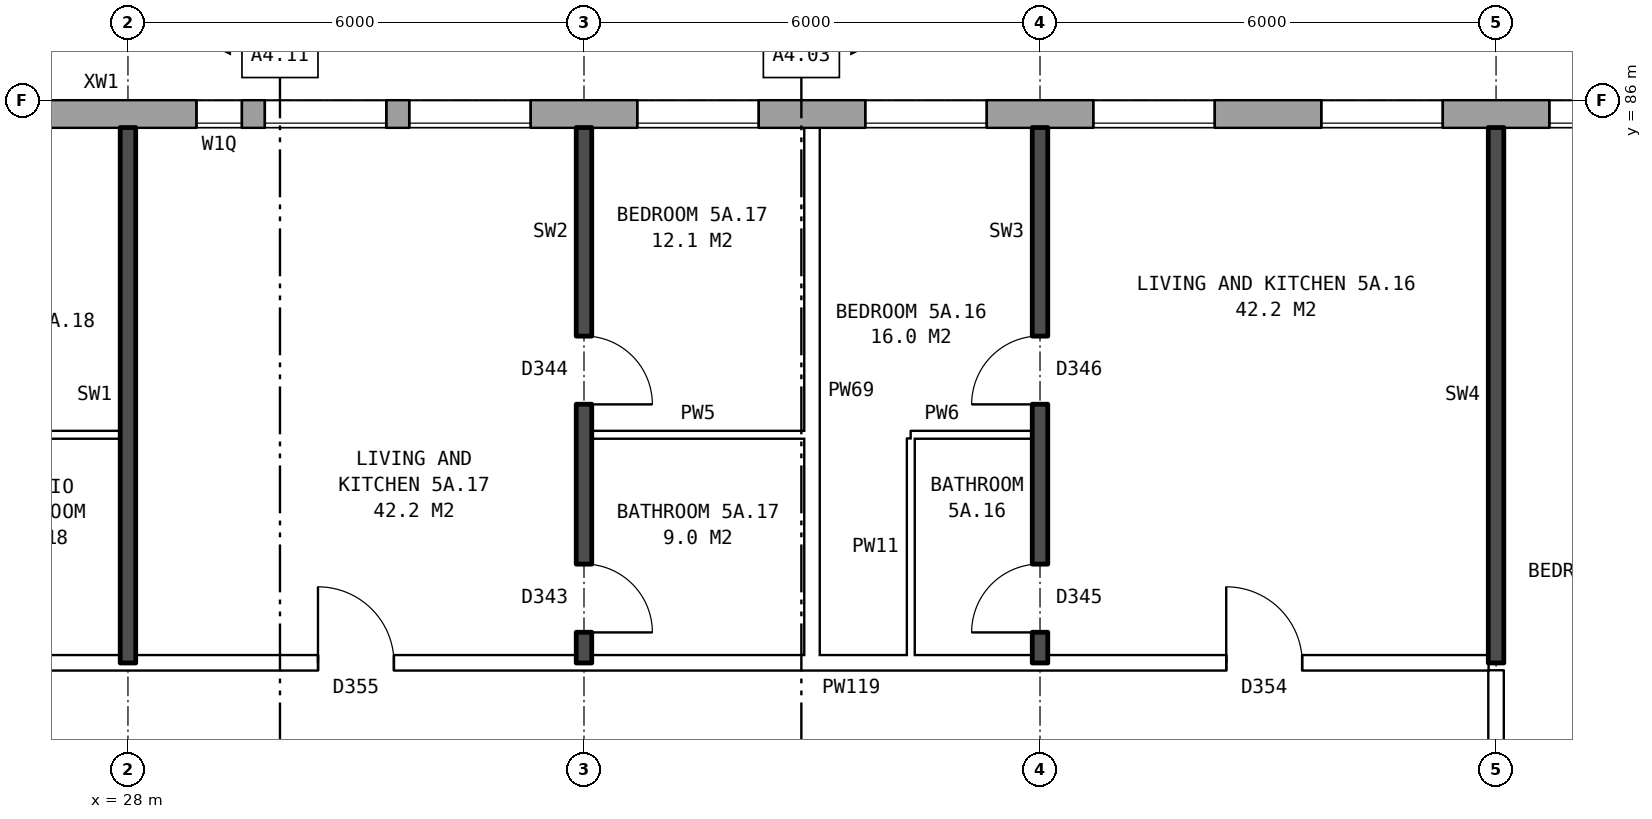
"""IFC4 building model, lengths in metres.
Left out: names, types, materials, properties, quantities, classifications, styles, units other than length and angle.
Written with IfcOpenShell. Run it as: python <this file> out.ifc"""

import sys

from ifc_helpers import new_model, si_unit, direction, frame, frame_2d, origin, place, context, subcontext, project, spatial, rectangle, extrude, element, fill, save


model = new_model("IFC4")
c1 = context("Model", 3, precision=1e-05, world=origin(), true_north=direction((0.0, 1.0)))
c2 = subcontext(c1, "Body", "Model", "MODEL_VIEW")
j1 = project(units=[si_unit("LENGTHUNIT", "METRE"), si_unit("PLANEANGLEUNIT", "RADIAN")], contexts=[c1])
p1 = place(None, origin())
s1 = spatial("IfcSite", under=j1, at=p1, CompositionType="ELEMENT")
p2 = place(p1, origin())
s2 = spatial("IfcBuilding", under=s1, at=p2, CompositionType="ELEMENT")
p3 = place(p2, frame((0.0, 0.0, 22.6)))
s3 = spatial("IfcBuildingStorey", under=s2, at=p3, CompositionType="ELEMENT", Elevation=22.6)
p4 = place(p3, frame((72.925, 85.82, 0.0), z_axis=(0.0, 0.0, 1.0), x_axis=(-1.0, 0.0, 0.0)))
e1 = element("IfcWall", 1, at=p4, inside=s3, PredefinedType="STANDARD", context=c2, shape_type="SweptSolid", body=[
    extrude(rectangle(XDim=50.101, YDim=0.36, at=frame_2d((25.05, 0.0))), origin(), (0.0, 0.0, 1.0), 2.85),
])
p5 = place(p4, frame((0.625, 0.0, 0.8)))
e2 = element("IfcOpeningElement", 2, at=p5, cuts=e1, PredefinedType="OPENING", context=c2, shape_type="SweptSolid", body=[
    extrude(rectangle(XDim=1.6, YDim=1.8, at=frame_2d((0.8, 0.9))), frame((0.0, 0.19, 0.0), z_axis=(0.0, -1.0, 0.0), x_axis=(1.0, 0.0, 0.0)), (0.0, 0.0, 1.0), 0.38),
])
p6 = place(p4, frame((3.125, 0.0, 1.7)))
e3 = element("IfcOpeningElement", 3, at=p6, cuts=e1, PredefinedType="OPENING", context=c2, shape_type="SweptSolid", body=[
    extrude(rectangle(XDim=0.8, YDim=0.9, at=frame_2d((0.4, 0.45))), frame((0.0, 0.19, 0.0), z_axis=(0.0, -1.0, 0.0), x_axis=(1.0, 0.0, 0.0)), (0.0, 0.0, 1.0), 0.38),
])
p7 = place(p4, frame((6.625, 0.0, 0.8)))
e4 = element("IfcOpeningElement", 4, at=p7, cuts=e1, PredefinedType="OPENING", context=c2, shape_type="SweptSolid", body=[
    extrude(rectangle(XDim=1.6, YDim=1.8, at=frame_2d((0.8, 0.9))), frame((0.0, 0.19, 0.0), z_axis=(0.0, -1.0, 0.0), x_axis=(1.0, 0.0, 0.0)), (0.0, 0.0, 1.0), 0.38),
])
p8 = place(p4, frame((9.625, 0.0, 0.8)))
e5 = element("IfcOpeningElement", 5, at=p8, cuts=e1, PredefinedType="OPENING", context=c2, shape_type="SweptSolid", body=[
    extrude(rectangle(XDim=1.6, YDim=1.8, at=frame_2d((0.8, 0.9))), frame((0.0, 0.19, 0.0), z_axis=(0.0, -1.0, 0.0), x_axis=(1.0, 0.0, 0.0)), (0.0, 0.0, 1.0), 0.38),
])
p9 = place(p4, frame((12.625, 0.0, 0.8)))
e6 = element("IfcOpeningElement", 6, at=p9, cuts=e1, PredefinedType="OPENING", context=c2, shape_type="SweptSolid", body=[
    extrude(rectangle(XDim=1.6, YDim=1.8, at=frame_2d((0.8, 0.9))), frame((0.0, 0.19, 0.0), z_axis=(0.0, -1.0, 0.0), x_axis=(1.0, 0.0, 0.0)), (0.0, 0.0, 1.0), 0.38),
])
p10 = place(p4, frame((15.625, 0.0, 0.8)))
e7 = element("IfcOpeningElement", 7, at=p10, cuts=e1, PredefinedType="OPENING", context=c2, shape_type="SweptSolid", body=[
    extrude(rectangle(XDim=1.6, YDim=1.8, at=frame_2d((0.8, 0.9))), frame((0.0, 0.19, 0.0), z_axis=(0.0, -1.0, 0.0), x_axis=(1.0, 0.0, 0.0)), (0.0, 0.0, 1.0), 0.38),
])
p11 = place(p4, frame((18.625, 0.0, 0.8)))
e8 = element("IfcOpeningElement", 8, at=p11, cuts=e1, PredefinedType="OPENING", context=c2, shape_type="SweptSolid", body=[
    extrude(rectangle(XDim=1.6, YDim=1.8, at=frame_2d((0.8, 0.9))), frame((0.0, 0.19, 0.0), z_axis=(0.0, -1.0, 0.0), x_axis=(1.0, 0.0, 0.0)), (0.0, 0.0, 1.0), 0.38),
])
p12 = place(p4, frame((21.625, 0.0, 0.8)))
e9 = element("IfcOpeningElement", 9, at=p12, cuts=e1, PredefinedType="OPENING", context=c2, shape_type="SweptSolid", body=[
    extrude(rectangle(XDim=1.6, YDim=1.8, at=frame_2d((0.8, 0.9))), frame((0.0, 0.19, 0.0), z_axis=(0.0, -1.0, 0.0), x_axis=(1.0, 0.0, 0.0)), (0.0, 0.0, 1.0), 0.38),
])
p13 = place(p4, frame((24.625, 0.0, 0.8)))
e10 = element("IfcOpeningElement", 10, at=p13, cuts=e1, PredefinedType="OPENING", context=c2, shape_type="SweptSolid", body=[
    extrude(rectangle(XDim=1.6, YDim=1.8, at=frame_2d((0.8, 0.9))), frame((0.0, 0.19, 0.0), z_axis=(0.0, -1.0, 0.0), x_axis=(1.0, 0.0, 0.0)), (0.0, 0.0, 1.0), 0.38),
])
p14 = place(p4, frame((27.625, 0.0, 0.8)))
e11 = element("IfcOpeningElement", 11, at=p14, cuts=e1, PredefinedType="OPENING", context=c2, shape_type="SweptSolid", body=[
    extrude(rectangle(XDim=1.6, YDim=1.8, at=frame_2d((0.8, 0.9))), frame((0.0, 0.19, 0.0), z_axis=(0.0, -1.0, 0.0), x_axis=(1.0, 0.0, 0.0)), (0.0, 0.0, 1.0), 0.38),
])
p15 = place(p4, frame((30.625, 0.0, 0.8)))
e12 = element("IfcOpeningElement", 12, at=p15, cuts=e1, PredefinedType="OPENING", context=c2, shape_type="SweptSolid", body=[
    extrude(rectangle(XDim=1.6, YDim=1.8, at=frame_2d((0.8, 0.9))), frame((0.0, 0.19, 0.0), z_axis=(0.0, -1.0, 0.0), x_axis=(1.0, 0.0, 0.0)), (0.0, 0.0, 1.0), 0.38),
])
p16 = place(p4, frame((33.625, 0.0, 0.8)))
e13 = element("IfcOpeningElement", 13, at=p16, cuts=e1, PredefinedType="OPENING", context=c2, shape_type="SweptSolid", body=[
    extrude(rectangle(XDim=1.6, YDim=1.8, at=frame_2d((0.8, 0.9))), frame((0.0, 0.19, 0.0), z_axis=(0.0, -1.0, 0.0), x_axis=(1.0, 0.0, 0.0)), (0.0, 0.0, 1.0), 0.38),
])
p17 = place(p4, frame((36.625, 0.0, 0.8)))
e14 = element("IfcOpeningElement", 14, at=p17, cuts=e1, PredefinedType="OPENING", context=c2, shape_type="SweptSolid", body=[
    extrude(rectangle(XDim=1.6, YDim=1.8, at=frame_2d((0.8, 0.9))), frame((0.0, 0.19, 0.0), z_axis=(0.0, -1.0, 0.0), x_axis=(1.0, 0.0, 0.0)), (0.0, 0.0, 1.0), 0.38),
])
p18 = place(p4, frame((39.625, 0.0, 0.8)))
e15 = element("IfcOpeningElement", 15, at=p18, cuts=e1, PredefinedType="OPENING", context=c2, shape_type="SweptSolid", body=[
    extrude(rectangle(XDim=1.6, YDim=1.8, at=frame_2d((0.8, 0.9))), frame((0.0, 0.19, 0.0), z_axis=(0.0, -1.0, 0.0), x_axis=(1.0, 0.0, 0.0)), (0.0, 0.0, 1.0), 0.38),
])
p19 = place(p4, frame((41.525, 0.0, 0.8)))
e16 = element("IfcOpeningElement", 16, at=p19, cuts=e1, PredefinedType="OPENING", context=c2, shape_type="SweptSolid", body=[
    extrude(rectangle(XDim=1.6, YDim=1.8, at=frame_2d((0.8, 0.9))), frame((0.0, 0.19, 0.0), z_axis=(0.0, -1.0, 0.0), x_axis=(1.0, 0.0, 0.0)), (0.0, 0.0, 1.0), 0.38),
])
p20 = place(p4, frame((46.525, 0.0, 1.4)))
e17 = element("IfcOpeningElement", 17, at=p20, cuts=e1, PredefinedType="OPENING", context=c2, shape_type="SweptSolid", body=[
    extrude(rectangle(XDim=1.0, YDim=1.2, at=frame_2d((0.5, 0.6))), frame((0.0, 0.19, 0.0), z_axis=(0.0, -1.0, 0.0), x_axis=(1.0, 0.0, 0.0)), (0.0, 0.0, 1.0), 0.38),
])
p21 = place(p4, frame((5.475, 0.0, 0.8)))
e18 = element("IfcOpeningElement", 18, at=p21, cuts=e1, PredefinedType="OPENING", context=c2, shape_type="SweptSolid", body=[
    extrude(rectangle(XDim=0.8, YDim=0.9, at=frame_2d((0.4, 0.45))), frame((0.0, 0.19, 0.0), z_axis=(0.0, -1.0, 0.0), x_axis=(1.0, 0.0, 0.0)), (0.0, 0.0, 1.0), 0.38),
])
p22 = place(p4, frame((43.425, 0.0, 0.8)))
e19 = element("IfcOpeningElement", 19, at=p22, cuts=e1, PredefinedType="OPENING", context=c2, shape_type="SweptSolid", body=[
    extrude(rectangle(XDim=0.6, YDim=1.2, at=frame_2d((0.3, 0.6))), frame((0.0, 0.19, 0.0), z_axis=(0.0, -1.0, 0.0), x_axis=(1.0, 0.0, 0.0)), (0.0, 0.0, 1.0), 0.38),
])
p23 = place(p4, frame((47.825, 0.0, 0.8)))
e20 = element("IfcOpeningElement", 20, at=p23, cuts=e1, PredefinedType="OPENING", context=c2, shape_type="SweptSolid", body=[
    extrude(rectangle(XDim=1.4, YDim=1.8, at=frame_2d((0.7, 0.9))), frame((0.0, 0.19, 0.0), z_axis=(0.0, -1.0, 0.0), x_axis=(1.0, 0.0, 0.0)), (0.0, 0.0, 1.0), 0.38),
])
p24 = place(p3, frame((20.11, 78.6, 0.0), z_axis=(0.0, 0.0, 1.0), x_axis=(1.0, 0.0, 0.0)))
e21 = element("IfcWall", 21, at=p24, inside=s3, PredefinedType="PARTITIONING", context=c2, shape_type="SweptSolid", body=[
    extrude(rectangle(XDim=25.79, YDim=0.2, at=frame_2d((12.895, 0.0))), origin(), (0.0, 0.0, 1.0), 2.85),
])
p25 = place(p24, frame((22.34, 0.0, 0.0)))
e22 = element("IfcOpeningElement", 22, at=p25, cuts=e21, PredefinedType="OPENING", context=c2, shape_type="SweptSolid", body=[
    extrude(rectangle(XDim=1.0, YDim=2.1, at=frame_2d((0.5, 1.05))), frame((0.0, 0.11, 0.0), z_axis=(0.0, -1.0, 0.0), x_axis=(1.0, 0.0, 0.0)), (0.0, 0.0, 1.0), 0.22),
])
p26 = place(p24, frame((10.39, 0.0, 0.0)))
e23 = element("IfcOpeningElement", 23, at=p26, cuts=e21, PredefinedType="OPENING", context=c2, shape_type="SweptSolid", body=[
    extrude(rectangle(XDim=1.0, YDim=2.1, at=frame_2d((0.5, 1.05))), frame((0.0, 0.11, 0.0), z_axis=(0.0, -1.0, 0.0), x_axis=(1.0, 0.0, 0.0)), (0.0, 0.0, 1.0), 0.22),
])
p27 = place(p24, frame((2.245, 0.0, 0.0)))
e24 = element("IfcOpeningElement", 24, at=p27, cuts=e21, PredefinedType="OPENING", context=c2, shape_type="SweptSolid", body=[
    extrude(rectangle(XDim=1.0, YDim=2.1, at=frame_2d((0.5, 1.05))), frame((0.0, 0.11, 0.0), z_axis=(0.0, -1.0, 0.0), x_axis=(1.0, 0.0, 0.0)), (0.0, 0.0, 1.0), 0.22),
])
p28 = place(p3, frame((25.6, 81.6, 0.0), z_axis=(0.0, 0.0, 1.0), x_axis=(1.0, 0.0, 0.0)))
e25 = element("IfcWall", 25, at=p28, inside=s3, PredefinedType="PARTITIONING", context=c2, shape_type="SweptSolid", body=[
    extrude(rectangle(XDim=2.3, YDim=0.1, at=frame_2d((1.15, 0.0))), origin(), (0.0, 0.0, 1.0), 2.85),
])
p29 = place(p3, frame((34.1, 81.6, 0.0), z_axis=(0.0, 0.0, 1.0), x_axis=(1.0, 0.0, 0.0)))
e26 = element("IfcWall", 26, at=p29, inside=s3, PredefinedType="PARTITIONING", context=c2, shape_type="SweptSolid", body=[
    extrude(rectangle(XDim=2.8, YDim=0.1, at=frame_2d((1.4, 0.0))), origin(), (0.0, 0.0, 1.0), 2.85),
])
p30 = place(p3, frame((38.3, 81.6, 0.0), z_axis=(0.0, 0.0, 1.0), x_axis=(1.0, 0.0, 0.0)))
e27 = element("IfcWall", 27, at=p30, inside=s3, PredefinedType="PARTITIONING", context=c2, shape_type="SweptSolid", body=[
    extrude(rectangle(XDim=1.6, YDim=0.1, at=frame_2d((0.8, 0.0))), origin(), (0.0, 0.0, 1.0), 2.85),
])
p31 = place(p3, frame((28.0, 78.6, 0.0), z_axis=(0.0, 0.0, 1.0), x_axis=(0.0, 1.0, 0.0)))
e28 = element("IfcWall", 28, at=p31, inside=s3, PredefinedType="SOLIDWALL", context=c2, shape_type="SweptSolid", body=[
    extrude(rectangle(XDim=7.04, YDim=0.2, at=frame_2d((3.52, 0.0))), origin(), (0.0, 0.0, 1.0), 2.85),
])
p32 = place(p3, frame((34.0, 78.6, 0.0), z_axis=(0.0, 0.0, 1.0), x_axis=(0.0, 1.0, 0.0)))
e29 = element("IfcWall", 29, at=p32, inside=s3, PredefinedType="SOLIDWALL", context=c2, shape_type="SweptSolid", body=[
    extrude(rectangle(XDim=7.04, YDim=0.2, at=frame_2d((3.52, 0.0))), origin(), (0.0, 0.0, 1.0), 2.85),
])
p33 = place(p32, frame((3.4, 0.0, 0.0)))
e30 = element("IfcOpeningElement", 30, at=p33, cuts=e29, PredefinedType="OPENING", context=c2, shape_type="SweptSolid", body=[
    extrude(rectangle(XDim=0.9, YDim=2.1, at=frame_2d((0.45, 1.05))), frame((0.0, 0.11, 0.0), z_axis=(0.0, -1.0, 0.0), x_axis=(1.0, 0.0, 0.0)), (0.0, 0.0, 1.0), 0.22),
])
p34 = place(p32, frame((0.4, 0.0, 0.0)))
e31 = element("IfcOpeningElement", 31, at=p34, cuts=e29, PredefinedType="OPENING", context=c2, shape_type="SweptSolid", body=[
    extrude(rectangle(XDim=0.9, YDim=2.1, at=frame_2d((0.45, 1.05))), frame((0.0, 0.11, 0.0), z_axis=(0.0, -1.0, 0.0), x_axis=(1.0, 0.0, 0.0)), (0.0, 0.0, 1.0), 0.22),
])
p35 = place(p3, frame((37.0, 78.7, 0.0), z_axis=(0.0, 0.0, 1.0), x_axis=(0.0, 1.0, 0.0)))
e32 = element("IfcWall", 32, at=p35, inside=s3, PredefinedType="PARTITIONING", context=c2, shape_type="SweptSolid", body=[
    extrude(rectangle(XDim=6.94, YDim=0.2, at=frame_2d((3.47, 0.0))), origin(), (0.0, 0.0, 1.0), 2.85),
])
p36 = place(p3, frame((38.3, 78.7, 0.0), z_axis=(0.0, 0.0, 1.0), x_axis=(0.0, 1.0, 0.0)))
e33 = element("IfcWall", 33, at=p36, inside=s3, PredefinedType="PARTITIONING", context=c2, shape_type="SweptSolid", body=[
    extrude(rectangle(XDim=2.85, YDim=0.1, at=frame_2d((1.425, 0.0))), origin(), (0.0, 0.0, 1.0), 2.85),
])
p37 = place(p3, frame((40.0, 78.6, 0.0), z_axis=(0.0, 0.0, 1.0), x_axis=(0.0, 1.0, 0.0)))
e34 = element("IfcWall", 34, at=p37, inside=s3, PredefinedType="SOLIDWALL", context=c2, shape_type="SweptSolid", body=[
    extrude(rectangle(XDim=7.04, YDim=0.2, at=frame_2d((3.52, 0.0))), origin(), (0.0, 0.0, 1.0), 2.85),
])
p38 = place(p37, frame((3.4, 0.0, 0.0)))
e35 = element("IfcOpeningElement", 35, at=p38, cuts=e34, PredefinedType="OPENING", context=c2, shape_type="SweptSolid", body=[
    extrude(rectangle(XDim=0.9, YDim=2.1, at=frame_2d((0.45, 1.05))), frame((0.0, 0.11, 0.0), z_axis=(0.0, -1.0, 0.0), x_axis=(1.0, 0.0, 0.0)), (0.0, 0.0, 1.0), 0.22),
])
p39 = place(p37, frame((0.4, 0.0, 0.0)))
e36 = element("IfcOpeningElement", 36, at=p39, cuts=e34, PredefinedType="OPENING", context=c2, shape_type="SweptSolid", body=[
    extrude(rectangle(XDim=0.9, YDim=2.1, at=frame_2d((0.45, 1.05))), frame((0.0, 0.11, 0.0), z_axis=(0.0, -1.0, 0.0), x_axis=(1.0, 0.0, 0.0)), (0.0, 0.0, 1.0), 0.22),
])
p40 = place(p3, frame((46.0, 76.3, 0.0), z_axis=(0.0, 0.0, 1.0), x_axis=(0.0, 1.0, 0.0)))
e37 = element("IfcWall", 37, at=p40, inside=s3, PredefinedType="PARTITIONING", context=c2, shape_type="SweptSolid", body=[
    extrude(rectangle(XDim=2.2, YDim=0.2, at=frame_2d((1.1, 0.0))), origin(), (0.0, 0.0, 1.0), 2.85),
])
p41 = place(p3, frame((46.0, 78.6, 0.0), z_axis=(0.0, 0.0, 1.0), x_axis=(0.0, 1.0, 0.0)))
e38 = element("IfcWall", 38, at=p41, inside=s3, PredefinedType="SOLIDWALL", context=c2, shape_type="SweptSolid", body=[
    extrude(rectangle(XDim=7.04, YDim=0.2, at=frame_2d((3.52, 0.0))), origin(), (0.0, 0.0, 1.0), 2.85),
])
p42 = place(p13, origin())
e39 = element("IfcWindow", 39, at=p42, inside=s3, PartitioningType="SINGLE_PANEL", PredefinedType="WINDOW", context=c2, shape_type="SweptSolid", body=[
    extrude(rectangle(XDim=1.6, YDim=1.8, at=frame_2d((0.8, 0.9))), frame((0.0, 0.15, 0.0), z_axis=(0.0, -1.0, 0.0), x_axis=(1.0, 0.0, 0.0)), (0.0, 0.0, 1.0), 0.06),
])
fill(e10, e39)
p43 = place(p14, origin())
e40 = element("IfcWindow", 40, at=p43, inside=s3, PartitioningType="SINGLE_PANEL", PredefinedType="WINDOW", context=c2, shape_type="SweptSolid", body=[
    extrude(rectangle(XDim=1.6, YDim=1.8, at=frame_2d((0.8, 0.9))), frame((0.0, 0.15, 0.0), z_axis=(0.0, -1.0, 0.0), x_axis=(1.0, 0.0, 0.0)), (0.0, 0.0, 1.0), 0.06),
])
fill(e11, e40)
p44 = place(p15, origin())
e41 = element("IfcWindow", 41, at=p44, inside=s3, PartitioningType="SINGLE_PANEL", PredefinedType="WINDOW", context=c2, shape_type="SweptSolid", body=[
    extrude(rectangle(XDim=1.6, YDim=1.8, at=frame_2d((0.8, 0.9))), frame((0.0, 0.15, 0.0), z_axis=(0.0, -1.0, 0.0), x_axis=(1.0, 0.0, 0.0)), (0.0, 0.0, 1.0), 0.06),
])
fill(e12, e41)
p45 = place(p16, origin())
e42 = element("IfcWindow", 42, at=p45, inside=s3, PartitioningType="SINGLE_PANEL", PredefinedType="WINDOW", context=c2, shape_type="SweptSolid", body=[
    extrude(rectangle(XDim=1.6, YDim=1.8, at=frame_2d((0.8, 0.9))), frame((0.0, 0.15, 0.0), z_axis=(0.0, -1.0, 0.0), x_axis=(1.0, 0.0, 0.0)), (0.0, 0.0, 1.0), 0.06),
])
fill(e13, e42)
p46 = place(p17, origin())
e43 = element("IfcWindow", 43, at=p46, inside=s3, PartitioningType="SINGLE_PANEL", PredefinedType="WINDOW", context=c2, shape_type="SweptSolid", body=[
    extrude(rectangle(XDim=1.6, YDim=1.8, at=frame_2d((0.8, 0.9))), frame((0.0, 0.15, 0.0), z_axis=(0.0, -1.0, 0.0), x_axis=(1.0, 0.0, 0.0)), (0.0, 0.0, 1.0), 0.06),
])
fill(e14, e43)
p47 = place(p18, origin())
e44 = element("IfcWindow", 44, at=p47, inside=s3, PartitioningType="SINGLE_PANEL", PredefinedType="WINDOW", context=c2, shape_type="SweptSolid", body=[
    extrude(rectangle(XDim=1.6, YDim=1.8, at=frame_2d((0.8, 0.9))), frame((0.0, 0.15, 0.0), z_axis=(0.0, -1.0, 0.0), x_axis=(1.0, 0.0, 0.0)), (0.0, 0.0, 1.0), 0.06),
])
fill(e15, e44)
p48 = place(p19, origin())
e45 = element("IfcWindow", 45, at=p48, inside=s3, PartitioningType="SINGLE_PANEL", PredefinedType="WINDOW", context=c2, shape_type="SweptSolid", body=[
    extrude(rectangle(XDim=1.6, YDim=1.8, at=frame_2d((0.8, 0.9))), frame((0.0, 0.15, 0.0), z_axis=(0.0, -1.0, 0.0), x_axis=(1.0, 0.0, 0.0)), (0.0, 0.0, 1.0), 0.06),
])
fill(e16, e45)
p49 = place(p38, origin())
e46 = element("IfcDoor", 46, at=p49, inside=s3, OperationType="SINGLE_SWING_LEFT", PredefinedType="DOOR", context=c2, shape_type="SweptSolid", body=[
    extrude(rectangle(XDim=0.9, YDim=2.1, at=frame_2d((0.45, 1.05))), frame((0.0, 0.025, 0.0), z_axis=(0.0, -1.0, 0.0), x_axis=(1.0, 0.0, 0.0)), (0.0, 0.0, 1.0), 0.05),
])
fill(e35, e46)
p50 = place(p25, origin())
e47 = element("IfcDoor", 47, at=p50, inside=s3, OperationType="SINGLE_SWING_LEFT", PredefinedType="DOOR", context=c2, shape_type="SweptSolid", body=[
    extrude(rectangle(XDim=1.0, YDim=2.1, at=frame_2d((0.5, 1.05))), frame((0.0, 0.025, 0.0), z_axis=(0.0, -1.0, 0.0), x_axis=(1.0, 0.0, 0.0)), (0.0, 0.0, 1.0), 0.05),
])
fill(e22, e47)
p51 = place(p39, origin())
e48 = element("IfcDoor", 48, at=p51, inside=s3, OperationType="SINGLE_SWING_LEFT", PredefinedType="DOOR", context=c2, shape_type="SweptSolid", body=[
    extrude(rectangle(XDim=0.9, YDim=2.1, at=frame_2d((0.45, 1.05))), frame((0.0, 0.025, 0.0), z_axis=(0.0, -1.0, 0.0), x_axis=(1.0, 0.0, 0.0)), (0.0, 0.0, 1.0), 0.05),
])
fill(e36, e48)
p52 = place(p33, frame((0.9, 0.0, 0.0), z_axis=(0.0, 0.0, 1.0), x_axis=(-1.0, 0.0, 0.0)))
e49 = element("IfcDoor", 49, at=p52, inside=s3, OperationType="SINGLE_SWING_RIGHT", PredefinedType="DOOR", context=c2, shape_type="SweptSolid", body=[
    extrude(rectangle(XDim=0.9, YDim=2.1, at=frame_2d((0.45, 1.05))), frame((0.0, 0.025, 0.0), z_axis=(0.0, -1.0, 0.0), x_axis=(1.0, 0.0, 0.0)), (0.0, 0.0, 1.0), 0.05),
])
fill(e30, e49)
p53 = place(p26, origin())
e50 = element("IfcDoor", 50, at=p53, inside=s3, OperationType="SINGLE_SWING_LEFT", PredefinedType="DOOR", context=c2, shape_type="SweptSolid", body=[
    extrude(rectangle(XDim=1.0, YDim=2.1, at=frame_2d((0.5, 1.05))), frame((0.0, 0.025, 0.0), z_axis=(0.0, -1.0, 0.0), x_axis=(1.0, 0.0, 0.0)), (0.0, 0.0, 1.0), 0.05),
])
fill(e23, e50)
p54 = place(p34, frame((0.9, 0.0, 0.0), z_axis=(0.0, 0.0, 1.0), x_axis=(-1.0, 0.0, 0.0)))
e51 = element("IfcDoor", 51, at=p54, inside=s3, OperationType="SINGLE_SWING_RIGHT", PredefinedType="DOOR", context=c2, shape_type="SweptSolid", body=[
    extrude(rectangle(XDim=0.9, YDim=2.1, at=frame_2d((0.45, 1.05))), frame((0.0, 0.025, 0.0), z_axis=(0.0, -1.0, 0.0), x_axis=(1.0, 0.0, 0.0)), (0.0, 0.0, 1.0), 0.05),
])
fill(e31, e51)
p55 = place(p22, origin())
e52 = element("IfcWindow", 52, at=p55, inside=s3, PartitioningType="SINGLE_PANEL", PredefinedType="WINDOW", context=c2, shape_type="SweptSolid", body=[
    extrude(rectangle(XDim=0.6, YDim=1.2, at=frame_2d((0.3, 0.6))), frame((0.0, 0.15, 0.0), z_axis=(0.0, -1.0, 0.0), x_axis=(1.0, 0.0, 0.0)), (0.0, 0.0, 1.0), 0.06),
])
fill(e19, e52)
save(model, sys.argv[1])
